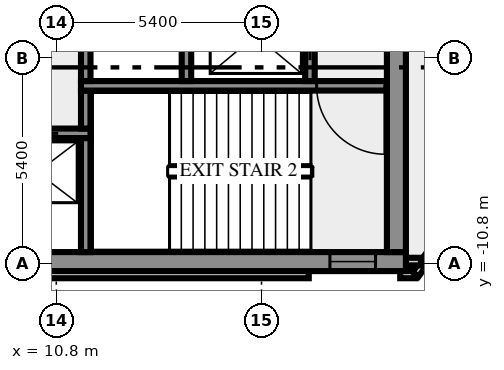
"""IFC4 building model, lengths in metres.
Left out: names, types, materials, properties, quantities, classifications, styles, units other than length and angle.
Written with IfcOpenShell. Run it as: python <this file> out.ifc"""

import sys

from ifc_helpers import new_model, si_unit, direction, frame, frame_2d, origin, place, context, subcontext, project, spatial, rectangle, extrude, element, fill, save


model = new_model("IFC4")
c1 = context("Model", 3, precision=1e-05, world=origin(), true_north=direction((0.0, 1.0)))
c2 = subcontext(c1, "Body", "Model", "MODEL_VIEW")
j1 = project(units=[si_unit("LENGTHUNIT", "METRE"), si_unit("PLANEANGLEUNIT", "RADIAN")], contexts=[c1])
p1 = place(None, origin())
s1 = spatial("IfcSite", under=j1, at=p1, CompositionType="ELEMENT")
p2 = place(p1, origin())
s2 = spatial("IfcBuilding", under=s1, at=p2, CompositionType="ELEMENT")
p3 = place(p2, frame((0.0, 0.0, 168.0)))
s3 = spatial("IfcBuildingStorey", under=s2, at=p3, CompositionType="ELEMENT", Elevation=168.0)
p4 = place(p3, frame((-17.444, -11.088, 0.0), z_axis=(0.0, 0.0, 1.0), x_axis=(1.0, 0.0, 0.0)))
e1 = element("IfcWall", 1, at=p4, inside=s3, PredefinedType="SOLIDWALL", context=c2, shape_type="SweptSolid", body=[
    extrude(rectangle(XDim=34.888, YDim=0.2, at=frame_2d((17.444, 0.0))), origin(), (0.0, 0.0, 1.0), 3.65),
])
p5 = place(p3, frame((19.85, -11.088, 0.0), z_axis=(0.0, 0.0, 1.0), x_axis=(1.0, 0.0, 0.0)))
e2 = element("IfcWall", 2, at=p5, inside=s3, PredefinedType="SOLIDWALL", context=c2, shape_type="SweptSolid", body=[
    extrude(rectangle(XDim=0.406, YDim=0.2, at=frame_2d((0.203, 0.0))), origin(), (0.0, 0.0, 1.0), 3.65),
])
p6 = place(p3, frame((20.253, -11.083, 0.0), z_axis=(0.0, 0.0, 1.0), x_axis=(0.587766567315, 0.809030569476, 0.0)))
e3 = element("IfcWall", 3, at=p6, inside=s3, PredefinedType="SOLIDWALL", context=c2, shape_type="SweptSolid", body=[
    extrude(rectangle(XDim=2.688, YDim=0.2, at=frame_2d((1.344, 0.0))), origin(), (0.0, 0.0, 1.0), 3.65),
])
p7 = place(p3, frame((19.98, -10.75, 0.0), z_axis=(0.0, 0.0, 1.0), x_axis=(1.0, 0.0, 0.0)))
e4 = element("IfcWall", 4, at=p7, inside=s3, PredefinedType="SOLIDWALL", context=c2, shape_type="SweptSolid", body=[
    extrude(rectangle(XDim=0.417, YDim=0.2, at=frame_2d((0.208, 0.0))), origin(), (0.0, 0.0, 1.0), 3.65),
])
p8 = place(p3, frame((-20.0, -10.75, 0.0), z_axis=(0.0, 0.0, 1.0), x_axis=(1.0, 0.0, 0.0)))
e5 = element("IfcWall", 5, at=p8, inside=s3, PredefinedType="SHEAR", context=c2, shape_type="SweptSolid", body=[
    extrude(rectangle(XDim=40.0, YDim=0.5, at=frame_2d((20.0, 0.0))), origin(), (0.0, 0.0, 1.0), 3.65),
])
p9 = place(p8, frame((0.8, 0.0, 1.0)))
e6 = element("IfcOpeningElement", 6, at=p9, cuts=e5, PredefinedType="OPENING", context=c2, shape_type="SweptSolid", body=[
    extrude(rectangle(XDim=1.2, YDim=1.2, at=frame_2d((0.6, 0.6))), frame((0.0, 0.26, 0.0), z_axis=(0.0, -1.0, 0.0), x_axis=(1.0, 0.0, 0.0)), (0.0, 0.0, 1.0), 0.52),
])
p10 = place(p8, frame((38.0, 0.0, 1.0)))
e7 = element("IfcOpeningElement", 7, at=p10, cuts=e5, PredefinedType="OPENING", context=c2, shape_type="SweptSolid", body=[
    extrude(rectangle(XDim=1.2, YDim=1.2, at=frame_2d((0.6, 0.6))), frame((0.0, 0.26, 0.0), z_axis=(0.0, -1.0, 0.0), x_axis=(1.0, 0.0, 0.0)), (0.0, 0.0, 1.0), 0.52),
])
p11 = place(p3, frame((11.575, -10.5, 0.0), z_axis=(0.0, 0.0, 1.0), x_axis=(0.0, 1.0, 0.0)))
e8 = element("IfcWall", 8, at=p11, inside=s3, PredefinedType="SHEAR", context=c2, shape_type="SweptSolid", body=[
    extrude(rectangle(XDim=3.0, YDim=0.25, at=frame_2d((1.5, 0.0))), origin(), (0.0, 0.0, 1.0), 3.65),
])
p12 = place(p3, frame((19.75, -10.5, 0.0), z_axis=(0.0, 0.0, 1.0), x_axis=(0.0, 1.0, 0.0)))
e9 = element("IfcWall", 9, at=p12, inside=s3, PredefinedType="SHEAR", context=c2, shape_type="SweptSolid", body=[
    extrude(rectangle(XDim=8.8, YDim=0.5, at=frame_2d((4.4, 0.0))), origin(), (0.0, 0.0, 1.0), 3.65),
])
p13 = place(p3, frame((11.7, -7.375, 0.0), z_axis=(0.0, 0.0, 1.0), x_axis=(-1.0, 0.0, 0.0)))
e10 = element("IfcWall", 10, at=p13, inside=s3, PredefinedType="SHEAR", context=c2, shape_type="SweptSolid", body=[
    extrude(rectangle(XDim=23.4, YDim=0.25, at=frame_2d((11.7, 0.0))), origin(), (0.0, 0.0, 1.0), 3.65),
])
p14 = place(p13, frame((20.213, 0.0, 0.0)))
e11 = element("IfcOpeningElement", 11, at=p14, cuts=e10, PredefinedType="OPENING", context=c2, shape_type="SweptSolid", body=[
    extrude(rectangle(XDim=0.9, YDim=2.1, at=frame_2d((0.45, 1.05))), frame((0.0, 0.135, 0.0), z_axis=(0.0, -1.0, 0.0), x_axis=(1.0, 0.0, 0.0)), (0.0, 0.0, 1.0), 0.27),
])
p15 = place(p13, frame((16.488, 0.0, 0.0)))
e12 = element("IfcOpeningElement", 12, at=p15, cuts=e10, PredefinedType="OPENING", context=c2, shape_type="SweptSolid", body=[
    extrude(rectangle(XDim=0.9, YDim=2.1, at=frame_2d((0.45, 1.05))), frame((0.0, 0.135, 0.0), z_axis=(0.0, -1.0, 0.0), x_axis=(1.0, 0.0, 0.0)), (0.0, 0.0, 1.0), 0.27),
])
p16 = place(p13, frame((14.45, 0.0, 0.0)))
e13 = element("IfcOpeningElement", 13, at=p16, cuts=e10, PredefinedType="OPENING", context=c2, shape_type="SweptSolid", body=[
    extrude(rectangle(XDim=0.9, YDim=2.1, at=frame_2d((0.45, 1.05))), frame((0.0, 0.135, 0.0), z_axis=(0.0, -1.0, 0.0), x_axis=(1.0, 0.0, 0.0)), (0.0, 0.0, 1.0), 0.27),
])
p17 = place(p13, frame((12.95, 0.0, 0.0)))
e14 = element("IfcOpeningElement", 14, at=p17, cuts=e10, PredefinedType="OPENING", context=c2, shape_type="SweptSolid", body=[
    extrude(rectangle(XDim=0.9, YDim=2.1, at=frame_2d((0.45, 1.05))), frame((0.0, 0.135, 0.0), z_axis=(0.0, -1.0, 0.0), x_axis=(1.0, 0.0, 0.0)), (0.0, 0.0, 1.0), 0.27),
])
p18 = place(p13, frame((11.475, 0.0, 0.0)))
e15 = element("IfcOpeningElement", 15, at=p18, cuts=e10, PredefinedType="OPENING", context=c2, shape_type="SweptSolid", body=[
    extrude(rectangle(XDim=0.9, YDim=2.1, at=frame_2d((0.45, 1.05))), frame((0.0, 0.135, 0.0), z_axis=(0.0, -1.0, 0.0), x_axis=(1.0, 0.0, 0.0)), (0.0, 0.0, 1.0), 0.27),
])
p19 = place(p13, frame((10.45, 0.0, 0.0)))
e16 = element("IfcOpeningElement", 16, at=p19, cuts=e10, PredefinedType="OPENING", context=c2, shape_type="SweptSolid", body=[
    extrude(rectangle(XDim=0.5, YDim=2.1, at=frame_2d((0.25, 1.05))), frame((0.0, 0.135, 0.0), z_axis=(0.0, -1.0, 0.0), x_axis=(1.0, 0.0, 0.0)), (0.0, 0.0, 1.0), 0.27),
])
p20 = place(p13, frame((8.35, 0.0, 0.0)))
e17 = element("IfcOpeningElement", 17, at=p20, cuts=e10, PredefinedType="OPENING", context=c2, shape_type="SweptSolid", body=[
    extrude(rectangle(XDim=1.1, YDim=2.1, at=frame_2d((0.55, 1.05))), frame((0.0, 0.135, 0.0), z_axis=(0.0, -1.0, 0.0), x_axis=(1.0, 0.0, 0.0)), (0.0, 0.0, 1.0), 0.27),
])
p21 = place(p13, frame((5.85, 0.0, 0.0)))
e18 = element("IfcOpeningElement", 18, at=p21, cuts=e10, PredefinedType="OPENING", context=c2, shape_type="SweptSolid", body=[
    extrude(rectangle(XDim=1.1, YDim=2.1, at=frame_2d((0.55, 1.05))), frame((0.0, 0.135, 0.0), z_axis=(0.0, -1.0, 0.0), x_axis=(1.0, 0.0, 0.0)), (0.0, 0.0, 1.0), 0.27),
])
p22 = place(p13, frame((3.35, 0.0, 0.0)))
e19 = element("IfcOpeningElement", 19, at=p22, cuts=e10, PredefinedType="OPENING", context=c2, shape_type="SweptSolid", body=[
    extrude(rectangle(XDim=1.1, YDim=2.1, at=frame_2d((0.55, 1.05))), frame((0.0, 0.135, 0.0), z_axis=(0.0, -1.0, 0.0), x_axis=(1.0, 0.0, 0.0)), (0.0, 0.0, 1.0), 0.27),
])
p23 = place(p13, frame((0.85, 0.0, 0.0)))
e20 = element("IfcOpeningElement", 20, at=p23, cuts=e10, PredefinedType="OPENING", context=c2, shape_type="SweptSolid", body=[
    extrude(rectangle(XDim=1.1, YDim=2.1, at=frame_2d((0.55, 1.05))), frame((0.0, 0.135, 0.0), z_axis=(0.0, -1.0, 0.0), x_axis=(1.0, 0.0, 0.0)), (0.0, 0.0, 1.0), 0.27),
])
p24 = place(p3, frame((11.575, -7.25, 0.0), z_axis=(0.0, 0.0, 1.0), x_axis=(0.0, 1.0, 0.0)))
e21 = element("IfcWall", 21, at=p24, inside=s3, PredefinedType="SHEAR", context=c2, shape_type="SweptSolid", body=[
    extrude(rectangle(XDim=1.0, YDim=0.25, at=frame_2d((0.5, 0.0))), origin(), (0.0, 0.0, 1.0), 3.65),
])
p25 = place(p3, frame((19.5, -6.125, 0.0), z_axis=(0.0, 0.0, 1.0), x_axis=(-1.0, 0.0, 0.0)))
e22 = element("IfcWall", 22, at=p25, inside=s3, PredefinedType="SHEAR", context=c2, shape_type="SweptSolid", body=[
    extrude(rectangle(XDim=8.05, YDim=0.25, at=frame_2d((4.025, 0.0))), origin(), (0.0, 0.0, 1.0), 3.65),
])
p26 = place(p25, frame((0.05, 0.0, 0.0)))
e23 = element("IfcOpeningElement", 23, at=p26, cuts=e22, PredefinedType="OPENING", context=c2, shape_type="SweptSolid", body=[
    extrude(rectangle(XDim=1.8, YDim=2.1, at=frame_2d((0.9, 1.05))), frame((0.0, 0.135, 0.0), z_axis=(0.0, -1.0, 0.0), x_axis=(1.0, 0.0, 0.0)), (0.0, 0.0, 1.0), 0.27),
])
for number, where, z_axis, x_axis in (
    (24, (11.575, -6.0, 0.0), (0.0, 0.0, 1.0), (0.0, 1.0, 0.0)),
    (25, (14.225, -6.0, 0.0), (0.0, 0.0, 1.0), (0.0, 1.0, 0.0)),
):
    element("IfcWall", number, at=place(p3, frame(where, z_axis=z_axis, x_axis=x_axis)), inside=s3, PredefinedType="SHEAR", context=c2, shape_type="SweptSolid", body=[
        extrude(rectangle(XDim=1.75, YDim=0.25, at=frame_2d((0.875, 0.0))), origin(), (0.0, 0.0, 1.0), 3.65),
    ])
p27 = place(p3, frame((17.475, -6.0, 0.0), z_axis=(0.0, 0.0, 1.0), x_axis=(0.0, 1.0, 0.0)))
e26 = element("IfcWall", 26, at=p27, inside=s3, PredefinedType="SHEAR", context=c2, shape_type="SweptSolid", body=[
    extrude(rectangle(XDim=4.3, YDim=0.25, at=frame_2d((2.15, 0.0))), origin(), (0.0, 0.0, 1.0), 3.65),
])
p28 = place(p27, frame((0.55, 0.0, 0.0)))
e27 = element("IfcOpeningElement", 27, at=p28, cuts=e26, PredefinedType="OPENING", context=c2, shape_type="SweptSolid", body=[
    extrude(rectangle(XDim=1.3, YDim=2.1, at=frame_2d((0.65, 1.05))), frame((0.0, 0.135, 0.0), z_axis=(0.0, -1.0, 0.0), x_axis=(1.0, 0.0, 0.0)), (0.0, 0.0, 1.0), 0.27),
])
p29 = place(p10, origin())
e28 = element("IfcWindow", 28, at=p29, inside=s3, PartitioningType="SINGLE_PANEL", PredefinedType="WINDOW", context=c2, shape_type="SweptSolid", body=[
    extrude(rectangle(XDim=1.2, YDim=1.2, at=frame_2d((0.6, 0.6))), frame((0.0, 0.03, 0.0), z_axis=(0.0, -1.0, 0.0), x_axis=(1.0, 0.0, 0.0)), (0.0, 0.0, 1.0), 0.06),
])
fill(e7, e28)
p30 = place(p23, origin())
e29 = element("IfcDoor", 29, at=p30, inside=s3, OperationType="DOUBLE_DOOR_SLIDING", PredefinedType="DOOR", context=c2, shape_type="SweptSolid", body=[
    extrude(rectangle(XDim=1.1, YDim=2.1, at=frame_2d((0.55, 1.05))), frame((0.0, 0.025, 0.0), z_axis=(0.0, -1.0, 0.0), x_axis=(1.0, 0.0, 0.0)), (0.0, 0.0, 1.0), 0.05),
])
fill(e20, e29)
p31 = place(p26, origin())
e30 = element("IfcDoor", 30, at=p31, inside=s3, OperationType="DOUBLE_DOOR_SINGLE_SWING", PredefinedType="DOOR", context=c2, shape_type="SweptSolid", body=[
    extrude(rectangle(XDim=1.8, YDim=2.1, at=frame_2d((0.9, 1.05))), frame((0.0, 0.025, 0.0), z_axis=(0.0, -1.0, 0.0), x_axis=(1.0, 0.0, 0.0)), (0.0, 0.0, 1.0), 0.05),
])
fill(e23, e30)
p32 = place(p28, origin())
e31 = element("IfcDoor", 31, at=p32, inside=s3, OperationType="DOUBLE_DOOR_SLIDING", PredefinedType="DOOR", context=c2, shape_type="SweptSolid", body=[
    extrude(rectangle(XDim=1.3, YDim=2.1, at=frame_2d((0.65, 1.05))), frame((0.0, 0.025, 0.0), z_axis=(0.0, -1.0, 0.0), x_axis=(1.0, 0.0, 0.0)), (0.0, 0.0, 1.0), 0.05),
])
fill(e27, e31)
save(model, sys.argv[1])
